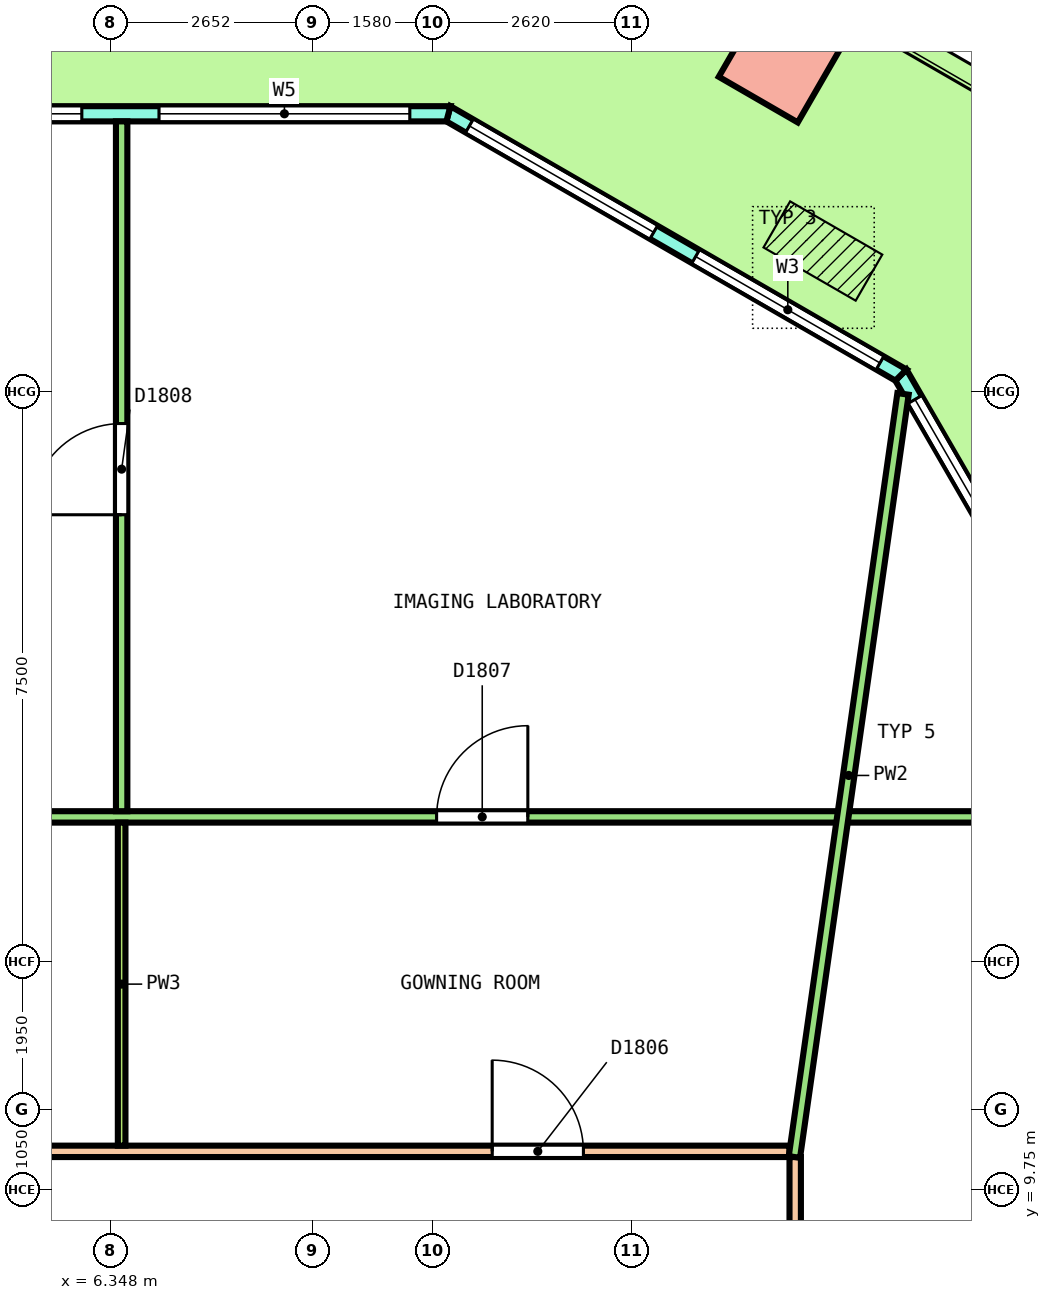
"""IFC4 building model, lengths in metres.
Left out: names, types, materials, properties, quantities, classifications, styles, units other than length and angle.
Written with IfcOpenShell. Run it as: python <this file> out.ifc"""

import sys

from ifc_helpers import new_model, si_unit, direction, frame, frame_2d, origin, origin_2d, place, context, subcontext, project, spatial, polyline, rectangle, outline, extrude, element, fill, save


model = new_model("IFC4")
c1 = context("Model", 3, precision=1e-05, world=origin(), true_north=direction((0.0, 1.0)))
c2 = subcontext(c1, "Body", "Model", "MODEL_VIEW")
j1 = project(units=[si_unit("LENGTHUNIT", "METRE"), si_unit("PLANEANGLEUNIT", "RADIAN")], contexts=[c1])
p1 = place(None, origin())
s1 = spatial("IfcSite", under=j1, at=p1, CompositionType="ELEMENT")
p2 = place(p1, origin())
s2 = spatial("IfcBuilding", under=s1, at=p2, CompositionType="ELEMENT")
p3 = place(p2, frame((0.0, 0.0, 171.6)))
s3 = spatial("IfcBuildingStorey", under=s2, at=p3, CompositionType="ELEMENT", Elevation=171.6)
p4 = place(p3, frame((15.164, 24.606, 0.0), z_axis=(0.036267419622, 0.0, 0.999342120734), x_axis=(-0.865313477853, 0.500246354177, 0.031403346616)))
e1 = element("IfcColumn", 1, at=p4, inside=s3, PredefinedType="COLUMN", context=c2, shape_type="SweptSolid", body=[
    extrude(rectangle(XDim=1.2, YDim=1.2, at=origin_2d()), origin(), (0.0, 0.0, 1.0), 4.052),
])
p5 = place(p3, frame((26.092, 4.267, 0.0), z_axis=(0.0, 0.0, 1.0), x_axis=(-0.500003086107, 0.866023622012, 0.0)))
e2 = element("IfcWall", 2, at=p5, inside=s3, PredefinedType="SOLIDWALL", context=c2, shape_type="SweptSolid", body=[
    extrude(outline(polyline([(-0.027, -0.1), (1.015, -0.1), (2.057, -0.1), (3.099, -0.1), (4.141, -0.1), (5.183, -0.1), (6.225, -0.1), (7.267, -0.1), (8.309, -0.1), (9.351, -0.1), (10.393, -0.1), (11.435, -0.1), (12.476, -0.1), (13.518, -0.1), (14.56, -0.1), (15.602, -0.1), (16.644, -0.1), (17.686, -0.1), (18.728, -0.1), (18.674, 0.1), (17.638, 0.1), (16.602, 0.1), (15.566, 0.1), (14.531, 0.1), (13.494, 0.1), (12.458, 0.1), (11.423, 0.1), (10.386, 0.1), (9.351, 0.1), (8.315, 0.1), (7.279, 0.1), (6.243, 0.1), (5.207, 0.1), (4.171, 0.1), (3.135, 0.1), (2.099, 0.1), (1.063, 0.1), (0.027, 0.1), (-0.027, -0.1)])), origin(), (0.0, 0.0, 1.0), 4.1),
])
p6 = place(p5, frame((0.37, 0.0, 0.1)))
e3 = element("IfcOpeningElement", 3, at=p6, cuts=e2, PredefinedType="OPENING", context=c2, shape_type="SweptSolid", body=[
    extrude(rectangle(XDim=3.0, YDim=2.9, at=frame_2d((1.5, 1.45))), frame((0.0, 0.11, 0.0), z_axis=(0.0, -1.0, 0.0), x_axis=(1.0, 0.0, 0.0)), (0.0, 0.0, 1.0), 0.22),
])
p7 = place(p5, frame((4.11, 0.0, 0.1)))
e4 = element("IfcOpeningElement", 4, at=p7, cuts=e2, PredefinedType="OPENING", context=c2, shape_type="SweptSolid", body=[
    extrude(rectangle(XDim=3.0, YDim=2.9, at=frame_2d((1.5, 1.45))), frame((0.0, 0.11, 0.0), z_axis=(0.0, -1.0, 0.0), x_axis=(1.0, 0.0, 0.0)), (0.0, 0.0, 1.0), 0.22),
])
p8 = place(p5, frame((8.451, 0.0, 0.0)))
e5 = element("IfcOpeningElement", 5, at=p8, cuts=e2, PredefinedType="OPENING", context=c2, shape_type="SweptSolid", body=[
    extrude(rectangle(XDim=1.8, YDim=2.4, at=frame_2d((0.9, 1.2))), frame((0.0, 0.11, 0.0), z_axis=(0.0, -1.0, 0.0), x_axis=(1.0, 0.0, 0.0)), (0.0, 0.0, 1.0), 0.22),
])
p9 = place(p5, frame((8.451, 0.0, 2.55)))
e6 = element("IfcOpeningElement", 6, at=p9, cuts=e2, PredefinedType="OPENING", context=c2, shape_type="SweptSolid", body=[
    extrude(rectangle(XDim=1.8, YDim=0.45, at=frame_2d((0.9, 0.225))), frame((0.0, 0.11, 0.0), z_axis=(0.0, -1.0, 0.0), x_axis=(1.0, 0.0, 0.0)), (0.0, 0.0, 1.0), 0.22),
])
p10 = place(p5, frame((11.591, 0.0, 0.1)))
e7 = element("IfcOpeningElement", 7, at=p10, cuts=e2, PredefinedType="OPENING", context=c2, shape_type="SweptSolid", body=[
    extrude(rectangle(XDim=3.0, YDim=2.9, at=frame_2d((1.5, 1.45))), frame((0.0, 0.11, 0.0), z_axis=(0.0, -1.0, 0.0), x_axis=(1.0, 0.0, 0.0)), (0.0, 0.0, 1.0), 0.22),
])
p11 = place(p5, frame((15.331, 0.0, 0.1)))
e8 = element("IfcOpeningElement", 8, at=p11, cuts=e2, PredefinedType="OPENING", context=c2, shape_type="SweptSolid", body=[
    extrude(rectangle(XDim=3.0, YDim=2.9, at=frame_2d((1.5, 1.45))), frame((0.0, 0.11, 0.0), z_axis=(0.0, -1.0, 0.0), x_axis=(1.0, 0.0, 0.0)), (0.0, 0.0, 1.0), 0.22),
])
p12 = place(p3, frame((16.741, 20.463, 0.0), z_axis=(0.0, 0.0, 1.0), x_axis=(-0.866029458321, 0.49999297727, 0.0)))
e9 = element("IfcWall", 9, at=p12, inside=s3, PredefinedType="SOLIDWALL", context=c2, shape_type="SweptSolid", body=[
    extrude(outline(polyline([(-0.027, -0.1), (1.128, -0.1), (2.282, -0.1), (3.437, -0.1), (4.592, -0.1), (5.747, -0.1), (6.901, -0.1), (6.848, 0.1), (5.711, 0.1), (4.574, 0.1), (3.437, 0.1), (2.301, 0.1), (1.164, 0.1), (0.027, 0.1), (-0.027, -0.1)])), origin(), (0.0, 0.0, 1.0), 4.1),
])
p13 = place(p12, frame((0.319, 0.0, 0.1)))
e10 = element("IfcOpeningElement", 10, at=p13, cuts=e9, PredefinedType="OPENING", context=c2, shape_type="SweptSolid", body=[
    extrude(rectangle(XDim=2.8, YDim=2.9, at=frame_2d((1.4, 1.45))), frame((0.0, 0.11, 0.0), z_axis=(0.0, -1.0, 0.0), x_axis=(1.0, 0.0, 0.0)), (0.0, 0.0, 1.0), 0.22),
])
p14 = place(p12, frame((3.756, 0.0, 0.1)))
e11 = element("IfcOpeningElement", 11, at=p14, cuts=e9, PredefinedType="OPENING", context=c2, shape_type="SweptSolid", body=[
    extrude(rectangle(XDim=2.8, YDim=2.9, at=frame_2d((1.4, 1.45))), frame((0.0, 0.11, 0.0), z_axis=(0.0, -1.0, 0.0), x_axis=(1.0, 0.0, 0.0)), (0.0, 0.0, 1.0), 0.22),
])
p15 = place(p3, frame((10.788, 23.9, 0.0), z_axis=(0.0, 0.0, 1.0), x_axis=(-1.0, 0.0, 0.0)))
e12 = element("IfcWall", 12, at=p15, inside=s3, PredefinedType="SOLIDWALL", context=c2, shape_type="SweptSolid", body=[
    extrude(outline(polyline([(-0.027, -0.1), (1.003, -0.1), (2.033, -0.1), (3.063, -0.1), (4.093, -0.1), (5.123, -0.1), (6.153, -0.1), (7.183, -0.1), (8.213, -0.1), (9.243, -0.1), (10.273, -0.1), (11.302, -0.1), (12.333, -0.1), (13.363, -0.1), (14.392, -0.1), (15.422, -0.1), (16.452, -0.1), (17.482, -0.1), (18.512, -0.1), (19.542, -0.1), (20.572, -0.1), (21.602, -0.1), (21.548, 0.1), (20.523, 0.1), (19.499, 0.1), (18.474, 0.1), (17.449, 0.1), (16.424, 0.1), (15.399, 0.1), (14.375, 0.1), (13.35, 0.1), (12.325, 0.1), (11.3, 0.1), (10.275, 0.1), (9.25, 0.1), (8.226, 0.1), (7.201, 0.1), (6.176, 0.1), (5.151, 0.1), (4.126, 0.1), (3.101, 0.1), (2.076, 0.1), (1.052, 0.1), (0.027, 0.1), (-0.027, -0.1)])), origin(), (0.0, 0.0, 1.0), 4.1),
])
p16 = place(p15, frame((0.508, 0.0, 0.1)))
e13 = element("IfcOpeningElement", 13, at=p16, cuts=e12, PredefinedType="OPENING", context=c2, shape_type="SweptSolid", body=[
    extrude(rectangle(XDim=3.3, YDim=2.9, at=frame_2d((1.65, 1.45))), frame((0.0, 0.11, 0.0), z_axis=(0.0, -1.0, 0.0), x_axis=(1.0, 0.0, 0.0)), (0.0, 0.0, 1.0), 0.22),
])
p17 = place(p15, frame((4.823, 0.0, 0.1)))
e14 = element("IfcOpeningElement", 14, at=p17, cuts=e12, PredefinedType="OPENING", context=c2, shape_type="SweptSolid", body=[
    extrude(rectangle(XDim=3.3, YDim=2.9, at=frame_2d((1.65, 1.45))), frame((0.0, 0.11, 0.0), z_axis=(0.0, -1.0, 0.0), x_axis=(1.0, 0.0, 0.0)), (0.0, 0.0, 1.0), 0.22),
])
p18 = place(p15, frame((9.888, 0.0, 0.0)))
e15 = element("IfcOpeningElement", 15, at=p18, cuts=e12, PredefinedType="OPENING", context=c2, shape_type="SweptSolid", body=[
    extrude(rectangle(XDim=1.8, YDim=2.4, at=frame_2d((0.9, 1.2))), frame((0.0, 0.11, 0.0), z_axis=(0.0, -1.0, 0.0), x_axis=(1.0, 0.0, 0.0)), (0.0, 0.0, 1.0), 0.22),
])
p19 = place(p15, frame((9.888, 0.0, 2.55)))
e16 = element("IfcOpeningElement", 16, at=p19, cuts=e12, PredefinedType="OPENING", context=c2, shape_type="SweptSolid", body=[
    extrude(rectangle(XDim=1.8, YDim=0.45, at=frame_2d((0.9, 0.225))), frame((0.0, 0.11, 0.0), z_axis=(0.0, -1.0, 0.0), x_axis=(1.0, 0.0, 0.0)), (0.0, 0.0, 1.0), 0.22),
])
p20 = place(p15, frame((13.453, 0.0, 0.1)))
e17 = element("IfcOpeningElement", 17, at=p20, cuts=e12, PredefinedType="OPENING", context=c2, shape_type="SweptSolid", body=[
    extrude(rectangle(XDim=3.3, YDim=2.9, at=frame_2d((1.65, 1.45))), frame((0.0, 0.11, 0.0), z_axis=(0.0, -1.0, 0.0), x_axis=(1.0, 0.0, 0.0)), (0.0, 0.0, 1.0), 0.22),
])
p21 = place(p15, frame((17.768, 0.0, 0.1)))
e18 = element("IfcOpeningElement", 18, at=p21, cuts=e12, PredefinedType="OPENING", context=c2, shape_type="SweptSolid", body=[
    extrude(rectangle(XDim=3.3, YDim=2.9, at=frame_2d((1.65, 1.45))), frame((0.0, 0.11, 0.0), z_axis=(0.0, -1.0, 0.0), x_axis=(1.0, 0.0, 0.0)), (0.0, 0.0, 1.0), 0.22),
])
p22 = place(p3, frame((15.35, 0.123, 0.0), z_axis=(0.0, 0.0, 1.0), x_axis=(0.0, 1.0, 0.0)))
e19 = element("IfcWall", 19, at=p22, inside=s3, PredefinedType="PARTITIONING", context=c2, shape_type="SweptSolid", body=[
    extrude(rectangle(XDim=10.052, YDim=0.15, at=frame_2d((5.026, 0.0))), origin(), (0.0, 0.0, 1.0), 3.05),
])
p23 = place(p22, frame((6.649, 0.0, 0.0)))
e20 = element("IfcOpeningElement", 20, at=p23, cuts=e19, PredefinedType="OPENING", context=c2, shape_type="SweptSolid", body=[
    extrude(rectangle(XDim=1.0, YDim=2.1, at=frame_2d((0.5, 1.05))), frame((0.0, 0.085, 0.0), z_axis=(0.0, -1.0, 0.0), x_axis=(1.0, 0.0, 0.0)), (0.0, 0.0, 1.0), 0.17),
])
p24 = place(p3, frame((-15.275, 10.25, 0.0), z_axis=(0.0, 0.0, 1.0), x_axis=(1.0, 0.0, 0.0)))
e21 = element("IfcWall", 21, at=p24, inside=s3, PredefinedType="PARTITIONING", context=c2, shape_type="SweptSolid", body=[
    extrude(rectangle(XDim=30.55, YDim=0.15, at=frame_2d((15.275, 0.0))), origin(), (0.0, 0.0, 1.0), 3.05),
])
p25 = place(p24, frame((26.638, 0.0, 0.0)))
e22 = element("IfcOpeningElement", 22, at=p25, cuts=e21, PredefinedType="OPENING", context=c2, shape_type="SweptSolid", body=[
    extrude(rectangle(XDim=1.2, YDim=2.1, at=frame_2d((0.6, 1.05))), frame((0.0, 0.085, 0.0), z_axis=(0.0, -1.0, 0.0), x_axis=(1.0, 0.0, 0.0)), (0.0, 0.0, 1.0), 0.17),
])
p26 = place(p24, frame((13.773, 0.0, 0.0)))
e23 = element("IfcOpeningElement", 23, at=p26, cuts=e21, PredefinedType="OPENING", context=c2, shape_type="SweptSolid", body=[
    extrude(rectangle(XDim=1.2, YDim=2.1, at=frame_2d((0.6, 1.05))), frame((0.0, 0.085, 0.0), z_axis=(0.0, -1.0, 0.0), x_axis=(1.0, 0.0, 0.0)), (0.0, 0.0, 1.0), 0.17),
])
p27 = place(p3, frame((-19.675, 14.65, 0.0), z_axis=(0.0, 0.0, 1.0), x_axis=(1.0, 0.0, 0.0)))
e24 = element("IfcWall", 24, at=p27, inside=s3, PredefinedType="PARTITIONING", context=c2, shape_type="SweptSolid", body=[
    extrude(rectangle(XDim=39.5, YDim=0.15, at=frame_2d((19.75, 0.0))), origin(), (0.0, 0.0, 1.0), 3.05),
])
p28 = place(p27, frame((30.308, 0.0, 0.0)))
e25 = element("IfcOpeningElement", 25, at=p28, cuts=e24, PredefinedType="OPENING", context=c2, shape_type="SweptSolid", body=[
    extrude(rectangle(XDim=1.2, YDim=2.1, at=frame_2d((0.6, 1.05))), frame((0.0, 0.085, 0.0), z_axis=(0.0, -1.0, 0.0), x_axis=(1.0, 0.0, 0.0)), (0.0, 0.0, 1.0), 0.17),
])
p29 = place(p3, frame((15.339, 10.176, 0.0), z_axis=(0.0, 0.0, 1.0), x_axis=(0.140962940667, 0.990014873302, 0.0)))
e26 = element("IfcWall", 26, at=p29, inside=s3, PredefinedType="PARTITIONING", context=c2, shape_type="SweptSolid", body=[
    extrude(rectangle(XDim=10.141, YDim=0.15, at=frame_2d((5.07, 0.0))), origin(), (0.0, 0.0, 1.0), 3.05),
])
p30 = place(p3, frame((6.489, 14.725, 0.0), z_axis=(0.0, 0.0, 1.0), x_axis=(0.0, 1.0, 0.0)))
e27 = element("IfcWall", 27, at=p30, inside=s3, PredefinedType="PARTITIONING", context=c2, shape_type="SweptSolid", body=[
    extrude(rectangle(XDim=9.075, YDim=0.15, at=frame_2d((4.538, 0.0))), origin(), (0.0, 0.0, 1.0), 3.05),
])
p31 = place(p30, frame((3.9, 0.0, 0.0)))
e28 = element("IfcOpeningElement", 28, at=p31, cuts=e27, PredefinedType="OPENING", context=c2, shape_type="SweptSolid", body=[
    extrude(rectangle(XDim=1.2, YDim=2.1, at=frame_2d((0.6, 1.05))), frame((0.0, 0.085, 0.0), z_axis=(0.0, -1.0, 0.0), x_axis=(1.0, 0.0, 0.0)), (0.0, 0.0, 1.0), 0.17),
])
p32 = place(p3, frame((6.489, 10.325, 0.0), z_axis=(0.0, 0.0, 1.0), x_axis=(0.0, 1.0, 0.0)))
e29 = element("IfcWall", 29, at=p32, inside=s3, PredefinedType="PARTITIONING", context=c2, shape_type="SweptSolid", body=[
    extrude(rectangle(XDim=4.25, YDim=0.1, at=frame_2d((2.125, 0.0))), origin(), (0.0, 0.0, 1.0), 3.05),
])
p33 = place(p11, origin())
e30 = element("IfcWindow", 30, at=p33, inside=s3, PartitioningType="SINGLE_PANEL", PredefinedType="WINDOW", context=c2, shape_type="SweptSolid", body=[
    extrude(rectangle(XDim=3.0, YDim=2.9, at=frame_2d((1.5, 1.45))), frame((0.0, 0.03, 0.0), z_axis=(0.0, -1.0, 0.0), x_axis=(1.0, 0.0, 0.0)), (0.0, 0.0, 1.0), 0.06),
])
fill(e8, e30)
p34 = place(p13, origin())
e31 = element("IfcWindow", 31, at=p34, inside=s3, PartitioningType="SINGLE_PANEL", PredefinedType="WINDOW", context=c2, shape_type="SweptSolid", body=[
    extrude(rectangle(XDim=2.8, YDim=2.9, at=frame_2d((1.4, 1.45))), frame((0.0, 0.03, 0.0), z_axis=(0.0, -1.0, 0.0), x_axis=(1.0, 0.0, 0.0)), (0.0, 0.0, 1.0), 0.06),
])
fill(e10, e31)
p35 = place(p14, origin())
e32 = element("IfcWindow", 32, at=p35, inside=s3, PartitioningType="SINGLE_PANEL", PredefinedType="WINDOW", context=c2, shape_type="SweptSolid", body=[
    extrude(rectangle(XDim=2.8, YDim=2.9, at=frame_2d((1.4, 1.45))), frame((0.0, 0.03, 0.0), z_axis=(0.0, -1.0, 0.0), x_axis=(1.0, 0.0, 0.0)), (0.0, 0.0, 1.0), 0.06),
])
fill(e11, e32)
p36 = place(p16, origin())
e33 = element("IfcWindow", 33, at=p36, inside=s3, PartitioningType="SINGLE_PANEL", PredefinedType="WINDOW", context=c2, shape_type="SweptSolid", body=[
    extrude(rectangle(XDim=3.3, YDim=2.9, at=frame_2d((1.65, 1.45))), frame((0.0, 0.03, 0.0), z_axis=(0.0, -1.0, 0.0), x_axis=(1.0, 0.0, 0.0)), (0.0, 0.0, 1.0), 0.06),
])
fill(e13, e33)
p37 = place(p17, origin())
e34 = element("IfcWindow", 34, at=p37, inside=s3, PartitioningType="SINGLE_PANEL", PredefinedType="WINDOW", context=c2, shape_type="SweptSolid", body=[
    extrude(rectangle(XDim=3.3, YDim=2.9, at=frame_2d((1.65, 1.45))), frame((0.0, 0.03, 0.0), z_axis=(0.0, -1.0, 0.0), x_axis=(1.0, 0.0, 0.0)), (0.0, 0.0, 1.0), 0.06),
])
fill(e14, e34)
p38 = place(p25, origin())
e35 = element("IfcDoor", 35, at=p38, inside=s3, OperationType="DOUBLE_DOOR_SINGLE_SWING", PredefinedType="DOOR", context=c2, shape_type="SweptSolid", body=[
    extrude(rectangle(XDim=1.2, YDim=2.1, at=frame_2d((0.6, 1.05))), frame((0.0, 0.025, 0.0), z_axis=(0.0, -1.0, 0.0), x_axis=(1.0, 0.0, 0.0)), (0.0, 0.0, 1.0), 0.05),
])
fill(e22, e35)
p39 = place(p28, origin())
e36 = element("IfcDoor", 36, at=p39, inside=s3, OperationType="DOUBLE_DOOR_SINGLE_SWING", PredefinedType="DOOR", context=c2, shape_type="SweptSolid", body=[
    extrude(rectangle(XDim=1.2, YDim=2.1, at=frame_2d((0.6, 1.05))), frame((0.0, 0.025, 0.0), z_axis=(0.0, -1.0, 0.0), x_axis=(1.0, 0.0, 0.0)), (0.0, 0.0, 1.0), 0.05),
])
fill(e25, e36)
p40 = place(p31, origin())
e37 = element("IfcDoor", 37, at=p40, inside=s3, OperationType="DOUBLE_DOOR_SINGLE_SWING", PredefinedType="DOOR", context=c2, shape_type="SweptSolid", body=[
    extrude(rectangle(XDim=1.2, YDim=2.1, at=frame_2d((0.6, 1.05))), frame((0.0, 0.025, 0.0), z_axis=(0.0, -1.0, 0.0), x_axis=(1.0, 0.0, 0.0)), (0.0, 0.0, 1.0), 0.05),
])
fill(e28, e37)
save(model, sys.argv[1])
